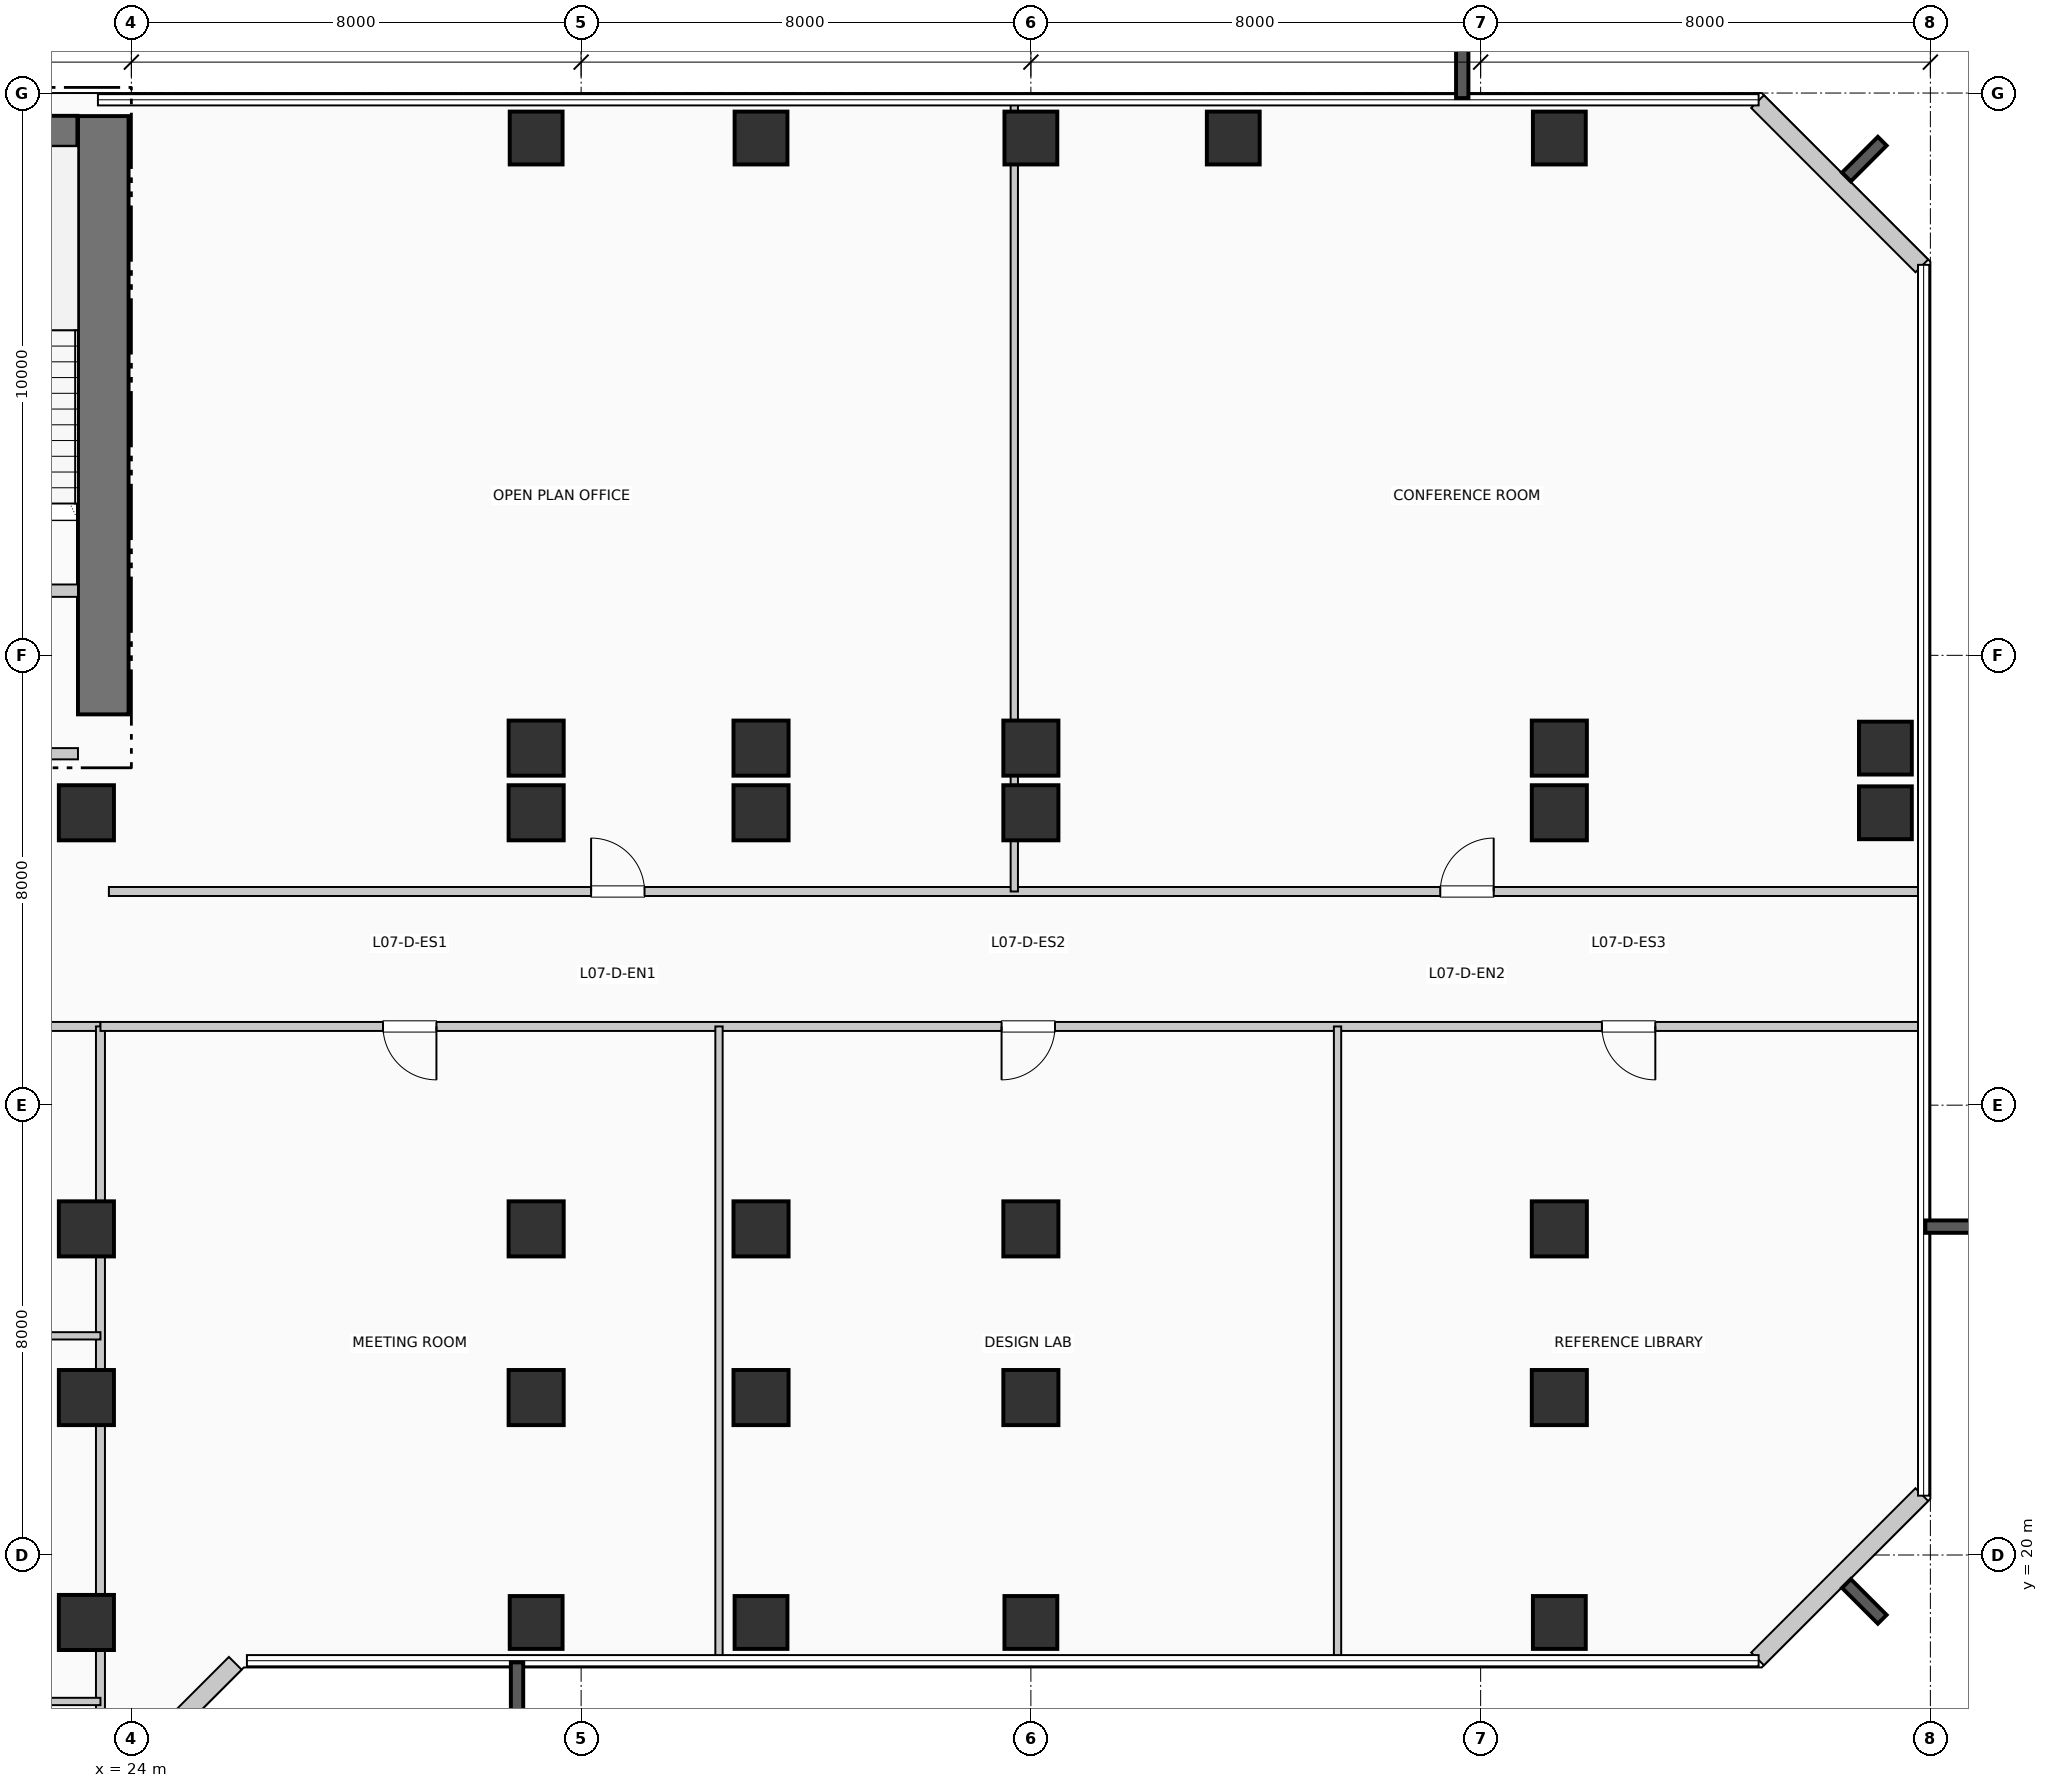
"""IFC4 building model, lengths in metres.
Left out: names, types, materials, properties, quantities, classifications, styles, units other than length and angle.
Written with IfcOpenShell. Run it as: python <this file> out.ifc"""

import sys

from ifc_helpers import new_model, si_unit, direction, frame, frame_2d, origin, origin_2d, place, context, subcontext, project, spatial, rectangle, extrude, element, fill, save


model = new_model("IFC4")
c1 = context("Model", 3, precision=1e-05, world=origin(), true_north=direction((0.0, 1.0)))
c2 = subcontext(c1, "Body", "Model", "MODEL_VIEW")
j1 = project(units=[si_unit("LENGTHUNIT", "METRE"), si_unit("PLANEANGLEUNIT", "RADIAN")], contexts=[c1])
p1 = place(None, origin())
s1 = spatial("IfcSite", under=j1, at=p1, CompositionType="ELEMENT")
p2 = place(p1, origin())
s2 = spatial("IfcBuilding", under=s1, at=p2, CompositionType="ELEMENT")
p3 = place(p2, frame((0.0, 0.0, 34.32)))
s3 = spatial("IfcBuildingStorey", under=s2, at=p3, CompositionType="ELEMENT", Elevation=34.32)
p4 = place(p3, frame((23.5, 34.95, 0.0), z_axis=(0.0, 0.0, 1.0), x_axis=(0.0, 1.0, 0.0)))
e1 = element("IfcWall", 1, at=p4, inside=s3, PredefinedType="SHEAR", context=c2, shape_type="SweptSolid", body=[
    extrude(rectangle(XDim=10.64, YDim=0.9, at=frame_2d((5.32, 0.0))), origin(), (0.0, 0.0, 1.0), 3.96),
])
p5 = place(p3, frame((19.35, 45.32, 0.0), z_axis=(0.0, 0.0, 1.0), x_axis=(1.0, 0.0, 0.0)))
e2 = element("IfcWall", 2, at=p5, inside=s3, PredefinedType="SHEAR", context=c2, shape_type="SweptSolid", body=[
    extrude(rectangle(XDim=3.69, YDim=0.55, at=frame_2d((1.845, 0.0))), origin(), (0.0, 0.0, 1.0), 3.96),
])
p6 = place(p5, frame((1.15, 0.0, 1.05)))
e3 = element("IfcOpeningElement", 3, at=p6, cuts=e2, PredefinedType="OPENING", context=c2, shape_type="SweptSolid", body=[
    extrude(rectangle(XDim=1.4, YDim=1.8, at=frame_2d((0.7, 0.9))), frame((0.0, 0.285, 0.0), z_axis=(0.0, -1.0, 0.0), x_axis=(1.0, 0.0, 0.0)), (0.0, 0.0, 1.0), 0.57),
])
for number, where, z_axis, x_axis in (
    (4, (23.2, 18.8, 0.0), (0.0, 0.0, 1.0), (1.0, 0.0, 0.0)),
    (5, (23.2, 22.8, 0.0), (0.0, 0.0, 1.0), (1.0, 0.0, 0.0)),
    (6, (23.2, 25.8, 0.0), (0.0, 0.0, 1.0), (1.0, 0.0, 0.0)),
    (7, (23.2, 33.2, 0.0), (0.0, 0.0, 1.0), (1.0, 0.0, 0.0)),
):
    element("IfcColumn", number, at=place(p3, frame(where, z_axis=z_axis, x_axis=x_axis)), inside=s3, PredefinedType="COLUMN", context=c2, shape_type="SweptSolid", body=[
        extrude(rectangle(XDim=0.98, YDim=0.98, at=origin_2d()), origin(), (0.0, 0.0, 1.0), 3.96),
    ])
p7 = place(p3, frame((31.2, 18.8, 0.0), z_axis=(0.0, 0.0, 1.0), x_axis=(1.0, 0.0, 0.0)))
e8 = element("IfcColumn", 8, at=p7, inside=s3, PredefinedType="COLUMN", context=c2, shape_type="SweptSolid", body=[
    extrude(rectangle(XDim=0.94, YDim=0.94, at=origin_2d()), origin(), (0.0, 0.0, 1.0), 3.96),
])
for number, where, z_axis, x_axis in (
    (9, (31.2, 22.8, 0.0), (0.0, 0.0, 1.0), (1.0, 0.0, 0.0)),
    (10, (31.2, 25.8, 0.0), (0.0, 0.0, 1.0), (1.0, 0.0, 0.0)),
    (11, (31.2, 33.2, 0.0), (0.0, 0.0, 1.0), (1.0, 0.0, 0.0)),
    (12, (31.2, 34.35, 0.0), (0.0, 0.0, 1.0), (1.0, 0.0, 0.0)),
):
    element("IfcColumn", number, at=place(p3, frame(where, z_axis=z_axis, x_axis=x_axis)), inside=s3, PredefinedType="COLUMN", context=c2, shape_type="SweptSolid", body=[
        extrude(rectangle(XDim=0.98, YDim=0.98, at=origin_2d()), origin(), (0.0, 0.0, 1.0), 3.96),
    ])
for number, where, z_axis, x_axis in (
    (13, (31.2, 45.2, 0.0), (0.0, 0.0, 1.0), (1.0, 0.0, 0.0)),
    (14, (35.2, 18.8, 0.0), (0.0, 0.0, 1.0), (1.0, 0.0, 0.0)),
):
    element("IfcColumn", number, at=place(p3, frame(where, z_axis=z_axis, x_axis=x_axis)), inside=s3, PredefinedType="COLUMN", context=c2, shape_type="SweptSolid", body=[
        extrude(rectangle(XDim=0.94, YDim=0.94, at=origin_2d()), origin(), (0.0, 0.0, 1.0), 3.96),
    ])
for number, where, z_axis, x_axis in (
    (15, (35.2, 22.8, 0.0), (0.0, 0.0, 1.0), (1.0, 0.0, 0.0)),
    (16, (35.2, 25.8, 0.0), (0.0, 0.0, 1.0), (1.0, 0.0, 0.0)),
    (17, (35.2, 33.2, 0.0), (0.0, 0.0, 1.0), (1.0, 0.0, 0.0)),
    (18, (35.2, 34.35, 0.0), (0.0, 0.0, 1.0), (1.0, 0.0, 0.0)),
):
    element("IfcColumn", number, at=place(p3, frame(where, z_axis=z_axis, x_axis=x_axis)), inside=s3, PredefinedType="COLUMN", context=c2, shape_type="SweptSolid", body=[
        extrude(rectangle(XDim=0.98, YDim=0.98, at=origin_2d()), origin(), (0.0, 0.0, 1.0), 3.96),
    ])
for number, where, z_axis, x_axis in (
    (19, (35.2, 45.2, 0.0), (0.0, 0.0, 1.0), (1.0, 0.0, 0.0)),
    (20, (40.0, 18.8, 0.0), (0.0, 0.0, 1.0), (1.0, 0.0, 0.0)),
):
    element("IfcColumn", number, at=place(p3, frame(where, z_axis=z_axis, x_axis=x_axis)), inside=s3, PredefinedType="COLUMN", context=c2, shape_type="SweptSolid", body=[
        extrude(rectangle(XDim=0.94, YDim=0.94, at=origin_2d()), origin(), (0.0, 0.0, 1.0), 3.96),
    ])
for number, where, z_axis, x_axis in (
    (21, (40.0, 22.8, 0.0), (0.0, 0.0, 1.0), (1.0, 0.0, 0.0)),
    (22, (40.0, 25.8, 0.0), (0.0, 0.0, 1.0), (1.0, 0.0, 0.0)),
    (23, (40.0, 33.2, 0.0), (0.0, 0.0, 1.0), (1.0, 0.0, 0.0)),
    (24, (40.0, 34.35, 0.0), (0.0, 0.0, 1.0), (1.0, 0.0, 0.0)),
):
    element("IfcColumn", number, at=place(p3, frame(where, z_axis=z_axis, x_axis=x_axis)), inside=s3, PredefinedType="COLUMN", context=c2, shape_type="SweptSolid", body=[
        extrude(rectangle(XDim=0.98, YDim=0.98, at=origin_2d()), origin(), (0.0, 0.0, 1.0), 3.96),
    ])
for number, where, z_axis, x_axis in (
    (25, (40.0, 45.2, 0.0), (0.0, 0.0, 1.0), (1.0, 0.0, 0.0)),
    (26, (43.6, 45.2, 0.0), (0.0, 0.0, 1.0), (1.0, 0.0, 0.0)),
    (27, (49.4, 18.8, 0.0), (0.0, 0.0, 1.0), (1.0, 0.0, 0.0)),
):
    element("IfcColumn", number, at=place(p3, frame(where, z_axis=z_axis, x_axis=x_axis)), inside=s3, PredefinedType="COLUMN", context=c2, shape_type="SweptSolid", body=[
        extrude(rectangle(XDim=0.94, YDim=0.94, at=origin_2d()), origin(), (0.0, 0.0, 1.0), 3.96),
    ])
for number, where, z_axis, x_axis in (
    (28, (49.4, 22.8, 0.0), (0.0, 0.0, 1.0), (1.0, 0.0, 0.0)),
    (29, (49.4, 25.8, 0.0), (0.0, 0.0, 1.0), (1.0, 0.0, 0.0)),
    (30, (49.4, 33.2, 0.0), (0.0, 0.0, 1.0), (1.0, 0.0, 0.0)),
    (31, (49.4, 34.35, 0.0), (0.0, 0.0, 1.0), (1.0, 0.0, 0.0)),
):
    element("IfcColumn", number, at=place(p3, frame(where, z_axis=z_axis, x_axis=x_axis)), inside=s3, PredefinedType="COLUMN", context=c2, shape_type="SweptSolid", body=[
        extrude(rectangle(XDim=0.98, YDim=0.98, at=origin_2d()), origin(), (0.0, 0.0, 1.0), 3.96),
    ])
for number, where, z_axis, x_axis in (
    (32, (49.4, 45.2, 0.0), (0.0, 0.0, 1.0), (1.0, 0.0, 0.0)),
    (33, (55.2, 33.2, 0.0), (0.0, 0.0, 1.0), (1.0, 0.0, 0.0)),
    (34, (55.2, 34.35, 0.0), (0.0, 0.0, 1.0), (1.0, 0.0, 0.0)),
):
    element("IfcColumn", number, at=place(p3, frame(where, z_axis=z_axis, x_axis=x_axis)), inside=s3, PredefinedType="COLUMN", context=c2, shape_type="SweptSolid", body=[
        extrude(rectangle(XDim=0.94, YDim=0.94, at=origin_2d()), origin(), (0.0, 0.0, 1.0), 3.96),
    ])
p8 = place(p3, frame((23.926, 16.152, 0.0), z_axis=(0.0, 0.0, 1.0), x_axis=(0.707106781187, 0.707106781187, 0.0)))
e35 = element("IfcWall", 35, at=p8, inside=s3, PredefinedType="SOLIDWALL", context=c2, shape_type="SweptSolid", body=[
    extrude(rectangle(XDim=2.718, YDim=0.32, at=frame_2d((1.359, 0.0))), origin(), (0.0, 0.0, 1.0), 3.71),
])
for number, where, z_axis, x_axis in (
    (36, (52.926, 18.152, 0.0), (0.0, 0.0, 1.0), (0.707, 0.707, 0.0)),
    (37, (55.848, 42.926, 0.0), (0.0, 0.0, 1.0), (-0.707, 0.707, 0.0)),
):
    element("IfcWall", number, at=place(p3, frame(where, z_axis=z_axis, x_axis=x_axis)), inside=s3, PredefinedType="SOLIDWALL", context=c2, shape_type="SweptSolid", body=[
        extrude(rectangle(XDim=4.133, YDim=0.32, at=frame_2d((2.066, 0.0))), origin(), (0.0, 0.0, 1.0), 3.71),
    ])
p9 = place(p3, frame((19.9, 37.15, 0.0), z_axis=(0.0, 0.0, 1.0), x_axis=(1.0, 0.0, 0.0)))
e38 = element("IfcWall", 38, at=p9, inside=s3, PredefinedType="PARTITIONING", context=c2, shape_type="SweptSolid", body=[
    extrude(rectangle(XDim=3.15, YDim=0.22, at=frame_2d((1.575, 0.0))), origin(), (0.0, 0.0, 1.0), 3.71),
])
p10 = place(p9, frame((2.05, 0.0, 0.0), z_axis=(0.0, 0.0, 1.0), x_axis=(-1.0, 0.0, 0.0)))
e39 = element("IfcOpeningElement", 39, at=p10, cuts=e38, PredefinedType="OPENING", context=c2, shape_type="SweptSolid", body=[
    extrude(rectangle(XDim=1.05, YDim=2.15, at=frame_2d((0.525, 1.075))), frame((0.0, 0.12, 0.0), z_axis=(0.0, -1.0, 0.0), x_axis=(1.0, 0.0, 0.0)), (0.0, 0.0, 1.0), 0.24),
])
p11 = place(p3, frame((19.8, 34.25, 0.0), z_axis=(0.0, 0.0, 1.0), x_axis=(1.0, 0.0, 0.0)))
e40 = element("IfcWall", 40, at=p11, inside=s3, PredefinedType="PARTITIONING", context=c2, shape_type="SweptSolid", body=[
    extrude(rectangle(XDim=3.25, YDim=0.2, at=frame_2d((1.625, 0.0))), origin(), (0.0, 0.0, 1.0), 3.71),
])
p12 = place(p11, frame((2.15, 0.0, 0.0), z_axis=(0.0, 0.0, 1.0), x_axis=(-1.0, 0.0, 0.0)))
e41 = element("IfcOpeningElement", 41, at=p12, cuts=e40, PredefinedType="OPENING", context=c2, shape_type="SweptSolid", body=[
    extrude(rectangle(XDim=1.1, YDim=2.15, at=frame_2d((0.55, 1.075))), frame((0.0, 0.11, 0.0), z_axis=(0.0, -1.0, 0.0), x_axis=(1.0, 0.0, 0.0)), (0.0, 0.0, 1.0), 0.22),
])
p13 = place(p3, frame((6.4, 29.4, 0.0), z_axis=(0.0, 0.0, 1.0), x_axis=(1.0, 0.0, 0.0)))
e42 = element("IfcWall", 42, at=p13, inside=s3, PredefinedType="PARTITIONING", context=c2, shape_type="SweptSolid", body=[
    extrude(rectangle(XDim=17.05, YDim=0.16, at=frame_2d((8.525, 0.0))), origin(), (0.0, 0.0, 1.0), 3.365),
])
p14 = place(p3, frame((23.45, 0.19, 0.0), z_axis=(0.0, 0.0, 1.0), x_axis=(0.0, 1.0, 0.0)))
e43 = element("IfcWall", 43, at=p14, inside=s3, PredefinedType="PARTITIONING", context=c2, shape_type="SweptSolid", body=[
    extrude(rectangle(XDim=29.21, YDim=0.16, at=frame_2d((14.605, 0.0))), origin(), (0.0, 0.0, 1.0), 2.995),
])
for number, where, z_axis, x_axis in (
    (44, (6.4, 17.395, 0.0), (0.0, 0.0, 1.0), (1.0, 0.0, 0.0)),
    (45, (6.4, 23.898, 0.0), (0.0, 0.0, 1.0), (1.0, 0.0, 0.0)),
):
    element("IfcWall", number, at=place(p3, frame(where, z_axis=z_axis, x_axis=x_axis)), inside=s3, PredefinedType="PARTITIONING", context=c2, shape_type="SweptSolid", body=[
        extrude(rectangle(XDim=17.05, YDim=0.13, at=frame_2d((8.525, 0.0))), origin(), (0.0, 0.0, 1.0), 3.71),
    ])
p15 = place(p3, frame((23.45, 29.4, 0.0), z_axis=(0.0, 0.0, 1.0), x_axis=(1.0, 0.0, 0.0)))
e46 = element("IfcWall", 46, at=p15, inside=s3, PredefinedType="PARTITIONING", context=c2, shape_type="SweptSolid", body=[
    extrude(rectangle(XDim=32.36, YDim=0.16, at=frame_2d((16.18, 0.0))), origin(), (0.0, 0.0, 1.0), 3.365),
])
p16 = place(p15, frame((5.976, 0.0, 0.0), z_axis=(0.0, 0.0, 1.0), x_axis=(-1.0, 0.0, 0.0)))
e47 = element("IfcOpeningElement", 47, at=p16, cuts=e46, PredefinedType="OPENING", context=c2, shape_type="SweptSolid", body=[
    extrude(rectangle(XDim=0.95, YDim=2.15, at=frame_2d((0.475, 1.075))), frame((0.0, 0.09, 0.0), z_axis=(0.0, -1.0, 0.0), x_axis=(1.0, 0.0, 0.0)), (0.0, 0.0, 1.0), 0.18),
])
p17 = place(p15, frame((16.979, 0.0, 0.0), z_axis=(0.0, 0.0, 1.0), x_axis=(-1.0, 0.0, 0.0)))
e48 = element("IfcOpeningElement", 48, at=p17, cuts=e46, PredefinedType="OPENING", context=c2, shape_type="SweptSolid", body=[
    extrude(rectangle(XDim=0.95, YDim=2.15, at=frame_2d((0.475, 1.075))), frame((0.0, 0.09, 0.0), z_axis=(0.0, -1.0, 0.0), x_axis=(1.0, 0.0, 0.0)), (0.0, 0.0, 1.0), 0.18),
])
p18 = place(p15, frame((27.657, 0.0, 0.0), z_axis=(0.0, 0.0, 1.0), x_axis=(-1.0, 0.0, 0.0)))
e49 = element("IfcOpeningElement", 49, at=p18, cuts=e46, PredefinedType="OPENING", context=c2, shape_type="SweptSolid", body=[
    extrude(rectangle(XDim=0.95, YDim=2.15, at=frame_2d((0.475, 1.075))), frame((0.0, 0.09, 0.0), z_axis=(0.0, -1.0, 0.0), x_axis=(1.0, 0.0, 0.0)), (0.0, 0.0, 1.0), 0.18),
])
p19 = place(p3, frame((23.6, 31.8, 0.0), z_axis=(0.0, 0.0, 1.0), x_axis=(1.0, 0.0, 0.0)))
e50 = element("IfcWall", 50, at=p19, inside=s3, PredefinedType="PARTITIONING", context=c2, shape_type="SweptSolid", body=[
    extrude(rectangle(XDim=32.21, YDim=0.16, at=frame_2d((16.105, 0.0))), origin(), (0.0, 0.0, 1.0), 3.71),
])
p20 = place(p19, frame((8.577, 0.0, 0.0)))
e51 = element("IfcOpeningElement", 51, at=p20, cuts=e50, PredefinedType="OPENING", context=c2, shape_type="SweptSolid", body=[
    extrude(rectangle(XDim=0.95, YDim=2.15, at=frame_2d((0.475, 1.075))), frame((0.0, 0.09, 0.0), z_axis=(0.0, -1.0, 0.0), x_axis=(1.0, 0.0, 0.0)), (0.0, 0.0, 1.0), 0.18),
])
p21 = place(p19, frame((23.683, 0.0, 0.0)))
e52 = element("IfcOpeningElement", 52, at=p21, cuts=e50, PredefinedType="OPENING", context=c2, shape_type="SweptSolid", body=[
    extrude(rectangle(XDim=0.95, YDim=2.15, at=frame_2d((0.475, 1.075))), frame((0.0, 0.09, 0.0), z_axis=(0.0, -1.0, 0.0), x_axis=(1.0, 0.0, 0.0)), (0.0, 0.0, 1.0), 0.18),
])
for number, where, z_axis, x_axis in (
    (53, (34.452, 18.19, 0.0), (0.0, 0.0, 1.0), (0.0, 1.0, 0.0)),
    (54, (45.455, 18.19, 0.0), (0.0, 0.0, 1.0), (0.0, 1.0, 0.0)),
):
    element("IfcWall", number, at=place(p3, frame(where, z_axis=z_axis, x_axis=x_axis)), inside=s3, PredefinedType="PARTITIONING", context=c2, shape_type="SweptSolid", body=[
        extrude(rectangle(XDim=11.21, YDim=0.13, at=frame_2d((5.605, 0.0))), origin(), (0.0, 0.0, 1.0), 3.71),
    ])
p22 = place(p3, frame((39.705, 31.8, 0.0), z_axis=(0.0, 0.0, 1.0), x_axis=(0.0, 1.0, 0.0)))
e55 = element("IfcWall", 55, at=p22, inside=s3, PredefinedType="PARTITIONING", context=c2, shape_type="SweptSolid", body=[
    extrude(rectangle(XDim=14.01, YDim=0.13, at=frame_2d((7.005, 0.0))), origin(), (0.0, 0.0, 1.0), 2.995),
])
p23 = place(p16, origin())
e56 = element("IfcDoor", 56, at=p23, inside=s3, OperationType="SINGLE_SWING_RIGHT", PredefinedType="DOOR", context=c2, shape_type="SweptSolid", body=[
    extrude(rectangle(XDim=0.95, YDim=2.15, at=frame_2d((0.475, 1.075))), frame((0.0, 0.025, 0.0), z_axis=(0.0, -1.0, 0.0), x_axis=(1.0, 0.0, 0.0)), (0.0, 0.0, 1.0), 0.05),
])
fill(e47, e56)
p24 = place(p17, origin())
e57 = element("IfcDoor", 57, at=p24, inside=s3, OperationType="SINGLE_SWING_LEFT", PredefinedType="DOOR", context=c2, shape_type="SweptSolid", body=[
    extrude(rectangle(XDim=0.95, YDim=2.15, at=frame_2d((0.475, 1.075))), frame((0.0, 0.025, 0.0), z_axis=(0.0, -1.0, 0.0), x_axis=(1.0, 0.0, 0.0)), (0.0, 0.0, 1.0), 0.05),
])
fill(e48, e57)
p25 = place(p18, origin())
e58 = element("IfcDoor", 58, at=p25, inside=s3, OperationType="SINGLE_SWING_RIGHT", PredefinedType="DOOR", context=c2, shape_type="SweptSolid", body=[
    extrude(rectangle(XDim=0.95, YDim=2.15, at=frame_2d((0.475, 1.075))), frame((0.0, 0.025, 0.0), z_axis=(0.0, -1.0, 0.0), x_axis=(1.0, 0.0, 0.0)), (0.0, 0.0, 1.0), 0.05),
])
fill(e49, e58)
p26 = place(p20, origin())
e59 = element("IfcDoor", 59, at=p26, inside=s3, OperationType="SINGLE_SWING_LEFT", PredefinedType="DOOR", context=c2, shape_type="SweptSolid", body=[
    extrude(rectangle(XDim=0.95, YDim=2.15, at=frame_2d((0.475, 1.075))), frame((0.0, 0.025, 0.0), z_axis=(0.0, -1.0, 0.0), x_axis=(1.0, 0.0, 0.0)), (0.0, 0.0, 1.0), 0.05),
])
fill(e51, e59)
p27 = place(p21, origin())
e60 = element("IfcDoor", 60, at=p27, inside=s3, OperationType="SINGLE_SWING_RIGHT", PredefinedType="DOOR", context=c2, shape_type="SweptSolid", body=[
    extrude(rectangle(XDim=0.95, YDim=2.15, at=frame_2d((0.475, 1.075))), frame((0.0, 0.025, 0.0), z_axis=(0.0, -1.0, 0.0), x_axis=(1.0, 0.0, 0.0)), (0.0, 0.0, 1.0), 0.05),
])
fill(e52, e60)
save(model, sys.argv[1])
